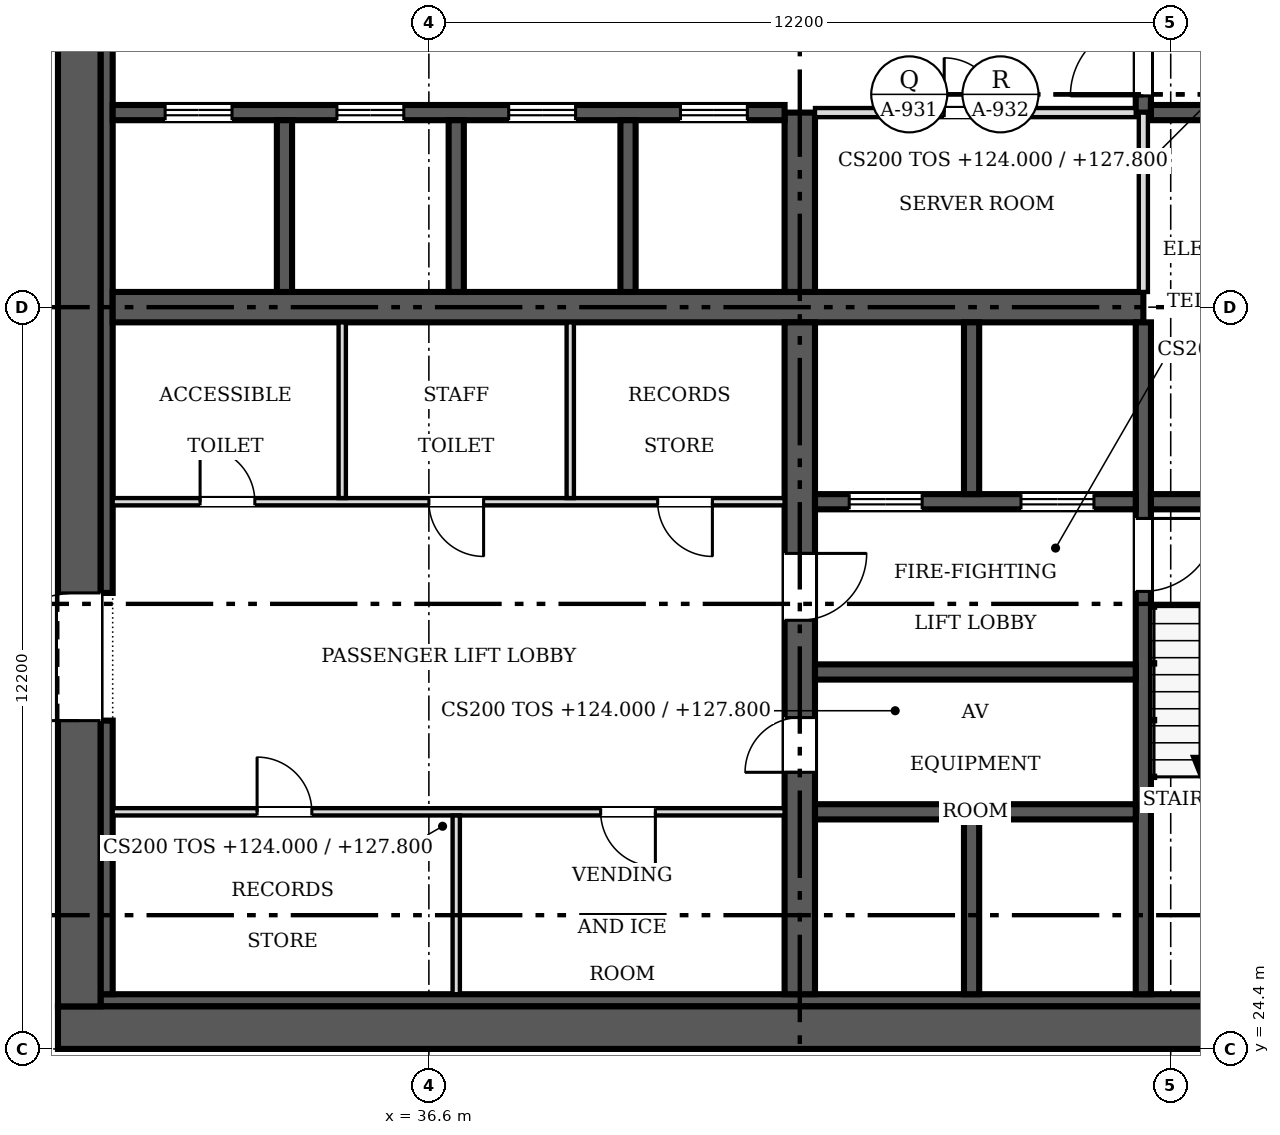
"""IFC4 building model, lengths in metres.
Left out: names, types, materials, properties, quantities, classifications, styles, units other than length and angle.
Written with IfcOpenShell. Run it as: python <this file> out.ifc"""

import sys

from ifc_helpers import new_model, si_unit, direction, frame, frame_2d, origin, place, context, subcontext, project, spatial, rectangle, extrude, source, transform, mapped, element, fill, save


model = new_model("IFC4")
c1 = context("Model", 3, precision=1e-05, world=origin(), true_north=direction((0.0, 1.0)))
c2 = subcontext(c1, "Body", "Model", "MODEL_VIEW")
j1 = project(units=[si_unit("LENGTHUNIT", "METRE"), si_unit("PLANEANGLEUNIT", "RADIAN")], contexts=[c1])
p1 = place(None, origin())
s1 = spatial("IfcSite", under=j1, at=p1, CompositionType="ELEMENT")
p2 = place(p1, origin())
s2 = spatial("IfcBuilding", under=s1, at=p2, CompositionType="ELEMENT")
p3 = place(p2, frame((0.0, 0.0, 124.0)))
s3 = spatial("IfcBuildingStorey", under=s2, at=p3, CompositionType="ELEMENT", Elevation=124.0)
p4 = place(p3, frame((54.9, 24.75, 0.0), z_axis=(0.0, 0.0, 1.0), x_axis=(-1.0, 0.0, 0.0)))
e1 = element("IfcWall", 1, at=p4, inside=s3, PredefinedType="SHEAR", context=c2, shape_type="SweptSolid", body=[
    extrude(rectangle(XDim=24.4, YDim=0.7, at=frame_2d((12.2, 0.0))), origin(), (0.0, 0.0, 1.0), 3.8),
])
m1 = source(origin(), c2, "Body", "SweptSolid", [
    extrude(rectangle(XDim=1.2, YDim=2.1, at=frame_2d((0.6, 1.05))), frame((0.0, 0.36, 0.0), z_axis=(0.0, -1.0, 0.0), x_axis=(1.0, 0.0, 0.0)), (0.0, 0.0, 1.0), 0.72),
])
p5 = place(p4, frame((1.5, 0.0, 0.0)))
e2 = element("IfcOpeningElement", 2, at=p5, cuts=e1, PredefinedType="OPENING", context=c2, shape_type="MappedRepresentation", body=[
    mapped(m1, transform((0.0, 0.0, 0.0), scale=1.0)),
])
p6 = place(p3, frame((30.85, 25.1, 0.0), z_axis=(0.0, 0.0, 1.0), x_axis=(0.0, 1.0, 0.0)))
e3 = element("IfcWall", 3, at=p6, inside=s3, PredefinedType="SHEAR", context=c2, shape_type="SweptSolid", body=[
    extrude(rectangle(XDim=23.0, YDim=0.7, at=frame_2d((11.5, 0.0))), origin(), (0.0, 0.0, 1.0), 3.8),
])
m2 = source(origin(), c2, "Body", "SweptSolid", [
    extrude(rectangle(XDim=2.1, YDim=2.4, at=frame_2d((1.05, 1.2))), frame((0.0, 0.36, 0.0), z_axis=(0.0, -1.0, 0.0), x_axis=(1.0, 0.0, 0.0)), (0.0, 0.0, 1.0), 0.72),
])
p7 = place(p6, frame((4.7, 0.0, 0.0)))
e4 = element("IfcOpeningElement", 4, at=p7, cuts=e3, PredefinedType="OPENING", context=c2, shape_type="MappedRepresentation", body=[
    mapped(m2, transform((0.0, 0.0, 0.0), scale=1.0)),
])
p8 = place(p6, frame((16.2, 0.0, 0.0)))
e5 = element("IfcOpeningElement", 5, at=p8, cuts=e3, PredefinedType="OPENING", context=c2, shape_type="MappedRepresentation", body=[
    mapped(m2, transform((0.0, 0.0, 0.0), scale=1.0)),
])
p9 = place(p3, frame((31.2, 25.2, 0.0), z_axis=(0.0, 0.0, 1.0), x_axis=(1.0, 0.0, 0.0)))
e6 = element("IfcWall", 6, at=p9, inside=s3, PredefinedType="SOLIDWALL", context=c2, shape_type="SweptSolid", body=[
    extrude(rectangle(XDim=21.0, YDim=0.2, at=frame_2d((10.5, 0.0))), origin(), (0.0, 0.0, 1.0), 3.8),
])
p10 = place(p3, frame((31.3, 25.3, 0.0), z_axis=(0.0, 0.0, 1.0), x_axis=(0.0, 1.0, 0.0)))
e7 = element("IfcWall", 7, at=p10, inside=s3, PredefinedType="SOLIDWALL", context=c2, shape_type="SweptSolid", body=[
    extrude(rectangle(XDim=4.5, YDim=0.2, at=frame_2d((2.25, 0.0))), origin(), (0.0, 0.0, 1.0), 3.8),
])
p11 = place(p3, frame((31.3, 31.9, 0.0), z_axis=(0.0, 0.0, 1.0), x_axis=(0.0, 1.0, 0.0)))
e8 = element("IfcWall", 8, at=p11, inside=s3, PredefinedType="SOLIDWALL", context=c2, shape_type="SweptSolid", body=[
    extrude(rectangle(XDim=9.4, YDim=0.2, at=frame_2d((4.7, 0.0))), origin(), (0.0, 0.0, 1.0), 3.8),
])
p12 = place(p3, frame((31.4, 36.6, 0.0), z_axis=(0.0, 0.0, 1.0), x_axis=(1.0, 0.0, 0.0)))
e9 = element("IfcWall", 9, at=p12, inside=s3, PredefinedType="SHEAR", context=c2, shape_type="SweptSolid", body=[
    extrude(rectangle(XDim=16.95, YDim=0.5, at=frame_2d((8.475, 0.0))), origin(), (0.0, 0.0, 1.0), 3.8),
])
p13 = place(p3, frame((42.7, 36.35, 0.0), z_axis=(0.0, 0.0, 1.0), x_axis=(0.0, -1.0, 0.0)))
e10 = element("IfcWall", 10, at=p13, inside=s3, PredefinedType="SHEAR", context=c2, shape_type="SweptSolid", body=[
    extrude(rectangle(XDim=11.05, YDim=0.5, at=frame_2d((5.525, 0.0))), origin(), (0.0, 0.0, 1.0), 3.8),
])
m3 = source(origin(), c2, "Body", "SweptSolid", [
    extrude(rectangle(XDim=0.9, YDim=2.1, at=frame_2d((0.45, 1.05))), frame((0.0, 0.26, 0.0), z_axis=(0.0, -1.0, 0.0), x_axis=(1.0, 0.0, 0.0)), (0.0, 0.0, 1.0), 0.52),
])
p14 = place(p13, frame((6.5, 0.0, 0.0)))
e11 = element("IfcOpeningElement", 11, at=p14, cuts=e10, PredefinedType="OPENING", context=c2, shape_type="MappedRepresentation", body=[
    mapped(m3, transform((0.0, 0.0, 0.0), scale=1.0)),
])
m4 = source(origin(), c2, "Body", "SweptSolid", [
    extrude(rectangle(XDim=1.1, YDim=2.1, at=frame_2d((0.55, 1.05))), frame((0.0, 0.26, 0.0), z_axis=(0.0, -1.0, 0.0), x_axis=(1.0, 0.0, 0.0)), (0.0, 0.0, 1.0), 0.52),
])
p15 = place(p13, frame((3.8, 0.0, 0.0)))
e12 = element("IfcOpeningElement", 12, at=p15, cuts=e10, PredefinedType="OPENING", context=c2, shape_type="MappedRepresentation", body=[
    mapped(m4, transform((0.0, 0.0, 0.0), scale=1.0)),
])
p16 = place(p3, frame((42.7, 36.85, 0.0), z_axis=(0.0, 0.0, 1.0), x_axis=(0.0, 1.0, 0.0)))
e13 = element("IfcWall", 13, at=p16, inside=s3, PredefinedType="SHEAR", context=c2, shape_type="SweptSolid", body=[
    extrude(rectangle(XDim=2.95, YDim=0.5, at=frame_2d((1.475, 0.0))), origin(), (0.0, 0.0, 1.0), 3.8),
])
p17 = place(p3, frame((31.4, 39.8, 0.0), z_axis=(0.0, 0.0, 1.0), x_axis=(1.0, 0.0, 0.0)))
e14 = element("IfcWall", 14, at=p17, inside=s3, PredefinedType="SOLIDWALL", context=c2, shape_type="SweptSolid", body=[
    extrude(rectangle(XDim=11.05, YDim=0.25, at=frame_2d((5.525, 0.0))), origin(), (0.0, 0.0, 1.0), 3.8),
])
m5 = source(origin(), c2, "Body", "SweptSolid", [
    extrude(rectangle(XDim=1.1, YDim=2.1, at=frame_2d((0.55, 1.05))), frame((0.0, 0.135, 0.0), z_axis=(0.0, -1.0, 0.0), x_axis=(1.0, 0.0, 0.0)), (0.0, 0.0, 1.0), 0.27),
])
p18 = place(p17, frame((0.863, 0.0, 0.0)))
e15 = element("IfcOpeningElement", 15, at=p18, cuts=e14, PredefinedType="OPENING", context=c2, shape_type="MappedRepresentation", body=[
    mapped(m5, transform((0.0, 0.0, 0.0), scale=1.0)),
])
p19 = place(p17, frame((3.688, 0.0, 0.0)))
e16 = element("IfcOpeningElement", 16, at=p19, cuts=e14, PredefinedType="OPENING", context=c2, shape_type="MappedRepresentation", body=[
    mapped(m5, transform((0.0, 0.0, 0.0), scale=1.0)),
])
p20 = place(p17, frame((6.512, 0.0, 0.0)))
e17 = element("IfcOpeningElement", 17, at=p20, cuts=e14, PredefinedType="OPENING", context=c2, shape_type="MappedRepresentation", body=[
    mapped(m5, transform((0.0, 0.0, 0.0), scale=1.0)),
])
p21 = place(p17, frame((9.337, 0.0, 0.0)))
e18 = element("IfcOpeningElement", 18, at=p21, cuts=e14, PredefinedType="OPENING", context=c2, shape_type="MappedRepresentation", body=[
    mapped(m5, transform((0.0, 0.0, 0.0), scale=1.0)),
])
p22 = place(p3, frame((48.35, 36.35, 0.0), z_axis=(0.0, 0.0, 1.0), x_axis=(0.0, -1.0, 0.0)))
e19 = element("IfcWall", 19, at=p22, inside=s3, PredefinedType="SOLIDWALL", context=c2, shape_type="SweptSolid", body=[
    extrude(rectangle(XDim=11.05, YDim=0.25, at=frame_2d((5.525, 0.0))), origin(), (0.0, 0.0, 1.0), 3.8),
])
m6 = source(origin(), c2, "Body", "SweptSolid", [
    extrude(rectangle(XDim=1.2, YDim=2.1, at=frame_2d((0.6, 1.05))), frame((0.0, 0.135, 0.0), z_axis=(0.0, -1.0, 0.0), x_axis=(1.0, 0.0, 0.0)), (0.0, 0.0, 1.0), 0.27),
])
p23 = place(p22, frame((3.225, 0.0, 0.0)))
e20 = element("IfcOpeningElement", 20, at=p23, cuts=e19, PredefinedType="OPENING", context=c2, shape_type="MappedRepresentation", body=[
    mapped(m6, transform((0.0, 0.0, 0.0), scale=1.0)),
])
p24 = place(p3, frame((48.225, 33.4, 0.0), z_axis=(0.0, 0.0, 1.0), x_axis=(-1.0, 0.0, 0.0)))
e21 = element("IfcWall", 21, at=p24, inside=s3, PredefinedType="SOLIDWALL", context=c2, shape_type="SweptSolid", body=[
    extrude(rectangle(XDim=5.275, YDim=0.25, at=frame_2d((2.638, 0.0))), origin(), (0.0, 0.0, 1.0), 3.8),
])
p25 = place(p24, frame((3.512, 0.0, 0.0)))
e22 = element("IfcOpeningElement", 22, at=p25, cuts=e21, PredefinedType="OPENING", context=c2, shape_type="MappedRepresentation", body=[
    mapped(m6, transform((0.0, 0.0, 0.0), scale=1.0)),
])
p26 = place(p24, frame((0.688, 0.0, 0.0)))
e23 = element("IfcOpeningElement", 23, at=p26, cuts=e21, PredefinedType="OPENING", context=c2, shape_type="MappedRepresentation", body=[
    mapped(m6, transform((0.0, 0.0, 0.0), scale=1.0)),
])
p27 = place(p3, frame((48.475, 33.4, 0.0), z_axis=(0.0, 0.0, 1.0), x_axis=(1.0, 0.0, 0.0)))
e24 = element("IfcWall", 24, at=p27, inside=s3, PredefinedType="SOLIDWALL", context=c2, shape_type="SweptSolid", body=[
    extrude(rectangle(XDim=3.525, YDim=0.25, at=frame_2d((1.762, 0.0))), origin(), (0.0, 0.0, 1.0), 3.8),
])
p28 = place(p3, frame((48.35, 47.9, 0.0), z_axis=(0.0, 0.0, 1.0), x_axis=(0.0, -1.0, 0.0)))
e25 = element("IfcWall", 25, at=p28, inside=s3, PredefinedType="SOLIDWALL", context=c2, shape_type="SweptSolid", body=[
    extrude(rectangle(XDim=8.1, YDim=0.25, at=frame_2d((4.05, 0.0))), origin(), (0.0, 0.0, 1.0), 3.8),
])
p29 = place(p28, frame((6.625, 0.0, 0.0)))
e26 = element("IfcOpeningElement", 26, at=p29, cuts=e25, PredefinedType="OPENING", context=c2, shape_type="MappedRepresentation", body=[
    mapped(m6, transform((0.0, 0.0, 0.0), scale=1.0)),
])
for number, where, z_axis, x_axis in (
    (27, (42.95, 28.3, 0.0), (0.0, 0.0, 1.0), (1.0, 0.0, 0.0)),
    (28, (42.95, 30.6, 0.0), (0.0, 0.0, 1.0), (1.0, 0.0, 0.0)),
):
    element("IfcWall", number, at=place(p3, frame(where, z_axis=z_axis, x_axis=x_axis)), inside=s3, PredefinedType="SOLIDWALL", context=c2, shape_type="SweptSolid", body=[
        extrude(rectangle(XDim=5.275, YDim=0.25, at=frame_2d((2.638, 0.0))), origin(), (0.0, 0.0, 1.0), 3.8),
    ])
p30 = place(p3, frame((48.475, 39.8, 0.0), z_axis=(0.0, 0.0, 1.0), x_axis=(1.0, 0.0, 0.0)))
e29 = element("IfcWall", 29, at=p30, inside=s3, PredefinedType="SOLIDWALL", context=c2, shape_type="SweptSolid", body=[
    extrude(rectangle(XDim=3.4, YDim=0.25, at=frame_2d((1.7, 0.0))), origin(), (0.0, 0.0, 1.0), 3.8),
])
for number, where, z_axis, x_axis in (
    (30, (34.225, 36.85, 0.0), (0.0, 0.0, 1.0), (0.0, 1.0, 0.0)),
    (31, (37.05, 36.85, 0.0), (0.0, 0.0, 1.0), (0.0, 1.0, 0.0)),
    (32, (39.875, 36.85, 0.0), (0.0, 0.0, 1.0), (0.0, 1.0, 0.0)),
):
    element("IfcWall", number, at=place(p3, frame(where, z_axis=z_axis, x_axis=x_axis)), inside=s3, PredefinedType="SOLIDWALL", context=c2, shape_type="SweptSolid", body=[
        extrude(rectangle(XDim=2.825, YDim=0.25, at=frame_2d((1.413, 0.0))), origin(), (0.0, 0.0, 1.0), 3.8),
    ])
p31 = place(p3, frame((45.525, 33.525, 0.0), z_axis=(0.0, 0.0, 1.0), x_axis=(0.0, 1.0, 0.0)))
e33 = element("IfcWall", 33, at=p31, inside=s3, PredefinedType="SOLIDWALL", context=c2, shape_type="SweptSolid", body=[
    extrude(rectangle(XDim=2.825, YDim=0.25, at=frame_2d((1.413, 0.0))), origin(), (0.0, 0.0, 1.0), 3.8),
])
p32 = place(p3, frame((45.525, 25.3, 0.0), z_axis=(0.0, 0.0, 1.0), x_axis=(0.0, 1.0, 0.0)))
e34 = element("IfcWall", 34, at=p32, inside=s3, PredefinedType="SOLIDWALL", context=c2, shape_type="SweptSolid", body=[
    extrude(rectangle(XDim=2.875, YDim=0.25, at=frame_2d((1.438, 0.0))), origin(), (0.0, 0.0, 1.0), 3.8),
])
p33 = place(p3, frame((42.45, 28.3, 0.0), z_axis=(0.0, 0.0, 1.0), x_axis=(-1.0, 0.0, 0.0)))
e35 = element("IfcWall", 35, at=p33, inside=s3, PredefinedType="PARTITIONING", context=c2, shape_type="SweptSolid", body=[
    extrude(rectangle(XDim=11.05, YDim=0.12, at=frame_2d((5.525, 0.0))), origin(), (0.0, 0.0, 1.0), 3.6),
])
m7 = source(origin(), c2, "Body", "SweptSolid", [
    extrude(rectangle(XDim=0.9, YDim=2.1, at=frame_2d((0.45, 1.05))), frame((0.0, 0.07, 0.0), z_axis=(0.0, -1.0, 0.0), x_axis=(1.0, 0.0, 0.0)), (0.0, 0.0, 1.0), 0.14),
])
p34 = place(p33, frame((7.775, 0.0, 0.0)))
e36 = element("IfcOpeningElement", 36, at=p34, cuts=e35, PredefinedType="OPENING", context=c2, shape_type="MappedRepresentation", body=[
    mapped(m7, transform((0.0, 0.0, 0.0), scale=1.0)),
])
p35 = place(p33, frame((2.125, 0.0, 0.0)))
e37 = element("IfcOpeningElement", 37, at=p35, cuts=e35, PredefinedType="OPENING", context=c2, shape_type="MappedRepresentation", body=[
    mapped(m7, transform((0.0, 0.0, 0.0), scale=1.0)),
])
p36 = place(p3, frame((31.4, 33.4, 0.0), z_axis=(0.0, 0.0, 1.0), x_axis=(1.0, 0.0, 0.0)))
e38 = element("IfcWall", 38, at=p36, inside=s3, PredefinedType="PARTITIONING", context=c2, shape_type="SweptSolid", body=[
    extrude(rectangle(XDim=11.05, YDim=0.12, at=frame_2d((5.525, 0.0))), origin(), (0.0, 0.0, 1.0), 3.6),
])
p37 = place(p36, frame((1.438, 0.0, 0.0)))
e39 = element("IfcOpeningElement", 39, at=p37, cuts=e38, PredefinedType="OPENING", context=c2, shape_type="MappedRepresentation", body=[
    mapped(m7, transform((0.0, 0.0, 0.0), scale=1.0)),
])
p38 = place(p36, frame((5.2, 0.0, 0.0)))
e40 = element("IfcOpeningElement", 40, at=p38, cuts=e38, PredefinedType="OPENING", context=c2, shape_type="MappedRepresentation", body=[
    mapped(m7, transform((0.0, 0.0, 0.0), scale=1.0)),
])
p39 = place(p36, frame((8.962, 0.0, 0.0)))
e41 = element("IfcOpeningElement", 41, at=p39, cuts=e38, PredefinedType="OPENING", context=c2, shape_type="MappedRepresentation", body=[
    mapped(m7, transform((0.0, 0.0, 0.0), scale=1.0)),
])
p40 = place(p3, frame((48.225, 39.8, 0.0), z_axis=(0.0, 0.0, 1.0), x_axis=(-1.0, 0.0, 0.0)))
e42 = element("IfcWall", 42, at=p40, inside=s3, PredefinedType="PARTITIONING", context=c2, shape_type="SweptSolid", body=[
    extrude(rectangle(XDim=5.275, YDim=0.15, at=frame_2d((2.638, 0.0))), origin(), (0.0, 0.0, 1.0), 3.6),
])
m8 = source(origin(), c2, "Body", "SweptSolid", [
    extrude(rectangle(XDim=0.9, YDim=2.1, at=frame_2d((0.45, 1.05))), frame((0.0, 0.085, 0.0), z_axis=(0.0, -1.0, 0.0), x_axis=(1.0, 0.0, 0.0)), (0.0, 0.0, 1.0), 0.17),
])
p41 = place(p40, frame((2.25, 0.0, 0.0)))
e43 = element("IfcOpeningElement", 43, at=p41, cuts=e42, PredefinedType="OPENING", context=c2, shape_type="MappedRepresentation", body=[
    mapped(m8, transform((0.0, 0.0, 0.0), scale=1.0)),
])
p42 = place(p3, frame((48.35, 36.85, 0.0), z_axis=(0.0, 0.0, 1.0), x_axis=(0.0, 1.0, 0.0)))
e44 = element("IfcWall", 44, at=p42, inside=s3, PredefinedType="PARTITIONING", context=c2, shape_type="SweptSolid", body=[
    extrude(rectangle(XDim=2.95, YDim=0.15, at=frame_2d((1.475, 0.0))), origin(), (0.0, 0.0, 1.0), 3.6),
])
for number, where, z_axis, x_axis in (
    (45, (35.175, 33.46, 0.0), (0.0, 0.0, 1.0), (0.0, 1.0, 0.0)),
    (46, (38.925, 33.46, 0.0), (0.0, 0.0, 1.0), (0.0, 1.0, 0.0)),
):
    element("IfcWall", number, at=place(p3, frame(where, z_axis=z_axis, x_axis=x_axis)), inside=s3, PredefinedType="PARTITIONING", context=c2, shape_type="SweptSolid", body=[
        extrude(rectangle(XDim=2.89, YDim=0.12, at=frame_2d((1.445, 0.0))), origin(), (0.0, 0.0, 1.0), 3.6),
    ])
p43 = place(p3, frame((37.05, 25.3, 0.0), z_axis=(0.0, 0.0, 1.0), x_axis=(0.0, 1.0, 0.0)))
e47 = element("IfcWall", 47, at=p43, inside=s3, PredefinedType="PARTITIONING", context=c2, shape_type="SweptSolid", body=[
    extrude(rectangle(XDim=2.94, YDim=0.12, at=frame_2d((1.47, 0.0))), origin(), (0.0, 0.0, 1.0), 3.6),
])
m9 = source(origin(), c2, "Body", "SweptSolid", [
    extrude(rectangle(XDim=2.1, YDim=2.4, at=frame_2d((1.05, 1.2))), frame((0.0, 0.025, 0.0), z_axis=(0.0, -1.0, 0.0), x_axis=(1.0, 0.0, 0.0)), (0.0, 0.0, 1.0), 0.05),
])
p44 = place(p7, origin())
e48 = element("IfcDoor", 48, at=p44, inside=s3, OperationType="DOUBLE_DOOR_SINGLE_SWING", PredefinedType="DOOR", context=c2, shape_type="MappedRepresentation", body=[
    mapped(m9, transform((0.0, 0.0, 0.0), scale=1.0)),
])
fill(e4, e48)
m10 = source(origin(), c2, "Body", "SweptSolid", [
    extrude(rectangle(XDim=0.9, YDim=2.1, at=frame_2d((0.45, 1.05))), frame((0.0, 0.025, 0.0), z_axis=(0.0, -1.0, 0.0), x_axis=(1.0, 0.0, 0.0)), (0.0, 0.0, 1.0), 0.05),
])
p45 = place(p14, origin())
e49 = element("IfcDoor", 49, at=p45, inside=s3, OperationType="SINGLE_SWING_RIGHT", PredefinedType="DOOR", context=c2, shape_type="MappedRepresentation", body=[
    mapped(m10, transform((0.0, 0.0, 0.0), scale=1.0)),
])
fill(e11, e49)
m11 = source(origin(), c2, "Body", "SweptSolid", [
    extrude(rectangle(XDim=1.1, YDim=2.1, at=frame_2d((0.55, 1.05))), frame((0.0, 0.025, 0.0), z_axis=(0.0, -1.0, 0.0), x_axis=(1.0, 0.0, 0.0)), (0.0, 0.0, 1.0), 0.05),
])
p46 = place(p15, origin())
e50 = element("IfcDoor", 50, at=p46, inside=s3, OperationType="SINGLE_SWING_LEFT", PredefinedType="DOOR", context=c2, shape_type="MappedRepresentation", body=[
    mapped(m11, transform((0.0, 0.0, 0.0), scale=1.0)),
])
fill(e12, e50)
p47 = place(p18, origin())
e51 = element("IfcDoor", 51, at=p47, inside=s3, OperationType="DOUBLE_DOOR_SLIDING", PredefinedType="DOOR", context=c2, shape_type="MappedRepresentation", body=[
    mapped(m11, transform((0.0, 0.0, 0.0), scale=1.0)),
])
fill(e15, e51)
p48 = place(p19, origin())
e52 = element("IfcDoor", 52, at=p48, inside=s3, OperationType="DOUBLE_DOOR_SLIDING", PredefinedType="DOOR", context=c2, shape_type="MappedRepresentation", body=[
    mapped(m11, transform((0.0, 0.0, 0.0), scale=1.0)),
])
fill(e16, e52)
p49 = place(p20, origin())
e53 = element("IfcDoor", 53, at=p49, inside=s3, OperationType="DOUBLE_DOOR_SLIDING", PredefinedType="DOOR", context=c2, shape_type="MappedRepresentation", body=[
    mapped(m11, transform((0.0, 0.0, 0.0), scale=1.0)),
])
fill(e17, e53)
p50 = place(p21, origin())
e54 = element("IfcDoor", 54, at=p50, inside=s3, OperationType="DOUBLE_DOOR_SLIDING", PredefinedType="DOOR", context=c2, shape_type="MappedRepresentation", body=[
    mapped(m11, transform((0.0, 0.0, 0.0), scale=1.0)),
])
fill(e18, e54)
m12 = source(origin(), c2, "Body", "SweptSolid", [
    extrude(rectangle(XDim=1.2, YDim=2.1, at=frame_2d((0.6, 1.05))), frame((0.0, 0.025, 0.0), z_axis=(0.0, -1.0, 0.0), x_axis=(1.0, 0.0, 0.0)), (0.0, 0.0, 1.0), 0.05),
])
p51 = place(p23, origin())
e55 = element("IfcDoor", 55, at=p51, inside=s3, OperationType="SINGLE_SWING_LEFT", PredefinedType="DOOR", context=c2, shape_type="MappedRepresentation", body=[
    mapped(m12, transform((0.0, 0.0, 0.0), scale=1.0)),
])
fill(e20, e55)
p52 = place(p25, origin())
e56 = element("IfcDoor", 56, at=p52, inside=s3, OperationType="DOUBLE_DOOR_SLIDING", PredefinedType="DOOR", context=c2, shape_type="MappedRepresentation", body=[
    mapped(m12, transform((0.0, 0.0, 0.0), scale=1.0)),
])
fill(e22, e56)
p53 = place(p26, origin())
e57 = element("IfcDoor", 57, at=p53, inside=s3, OperationType="DOUBLE_DOOR_SLIDING", PredefinedType="DOOR", context=c2, shape_type="MappedRepresentation", body=[
    mapped(m12, transform((0.0, 0.0, 0.0), scale=1.0)),
])
fill(e23, e57)
p54 = place(p29, origin())
e58 = element("IfcDoor", 58, at=p54, inside=s3, OperationType="SINGLE_SWING_RIGHT", PredefinedType="DOOR", context=c2, shape_type="MappedRepresentation", body=[
    mapped(m12, transform((0.0, 0.0, 0.0), scale=1.0)),
])
fill(e26, e58)
p55 = place(p34, origin())
e59 = element("IfcDoor", 59, at=p55, inside=s3, OperationType="SINGLE_SWING_RIGHT", PredefinedType="DOOR", context=c2, shape_type="MappedRepresentation", body=[
    mapped(m10, transform((0.0, 0.0, 0.0), scale=1.0)),
])
fill(e36, e59)
p56 = place(p35, origin())
e60 = element("IfcDoor", 60, at=p56, inside=s3, OperationType="SINGLE_SWING_LEFT", PredefinedType="DOOR", context=c2, shape_type="MappedRepresentation", body=[
    mapped(m10, transform((0.0, 0.0, 0.0), scale=1.0)),
])
fill(e37, e60)
p57 = place(p37, origin())
e61 = element("IfcDoor", 61, at=p57, inside=s3, OperationType="SINGLE_SWING_LEFT", PredefinedType="DOOR", context=c2, shape_type="MappedRepresentation", body=[
    mapped(m10, transform((0.0, 0.0, 0.0), scale=1.0)),
])
fill(e39, e61)
p58 = place(p38, origin())
e62 = element("IfcDoor", 62, at=p58, inside=s3, OperationType="SINGLE_SWING_RIGHT", PredefinedType="DOOR", context=c2, shape_type="MappedRepresentation", body=[
    mapped(m10, transform((0.0, 0.0, 0.0), scale=1.0)),
])
fill(e40, e62)
p59 = place(p39, origin())
e63 = element("IfcDoor", 63, at=p59, inside=s3, OperationType="SINGLE_SWING_RIGHT", PredefinedType="DOOR", context=c2, shape_type="MappedRepresentation", body=[
    mapped(m10, transform((0.0, 0.0, 0.0), scale=1.0)),
])
fill(e41, e63)
p60 = place(p41, origin())
e64 = element("IfcDoor", 64, at=p60, inside=s3, OperationType="SINGLE_SWING_RIGHT", PredefinedType="DOOR", context=c2, shape_type="MappedRepresentation", body=[
    mapped(m10, transform((0.0, 0.0, 0.0), scale=1.0)),
])
fill(e43, e64)
save(model, sys.argv[1])
